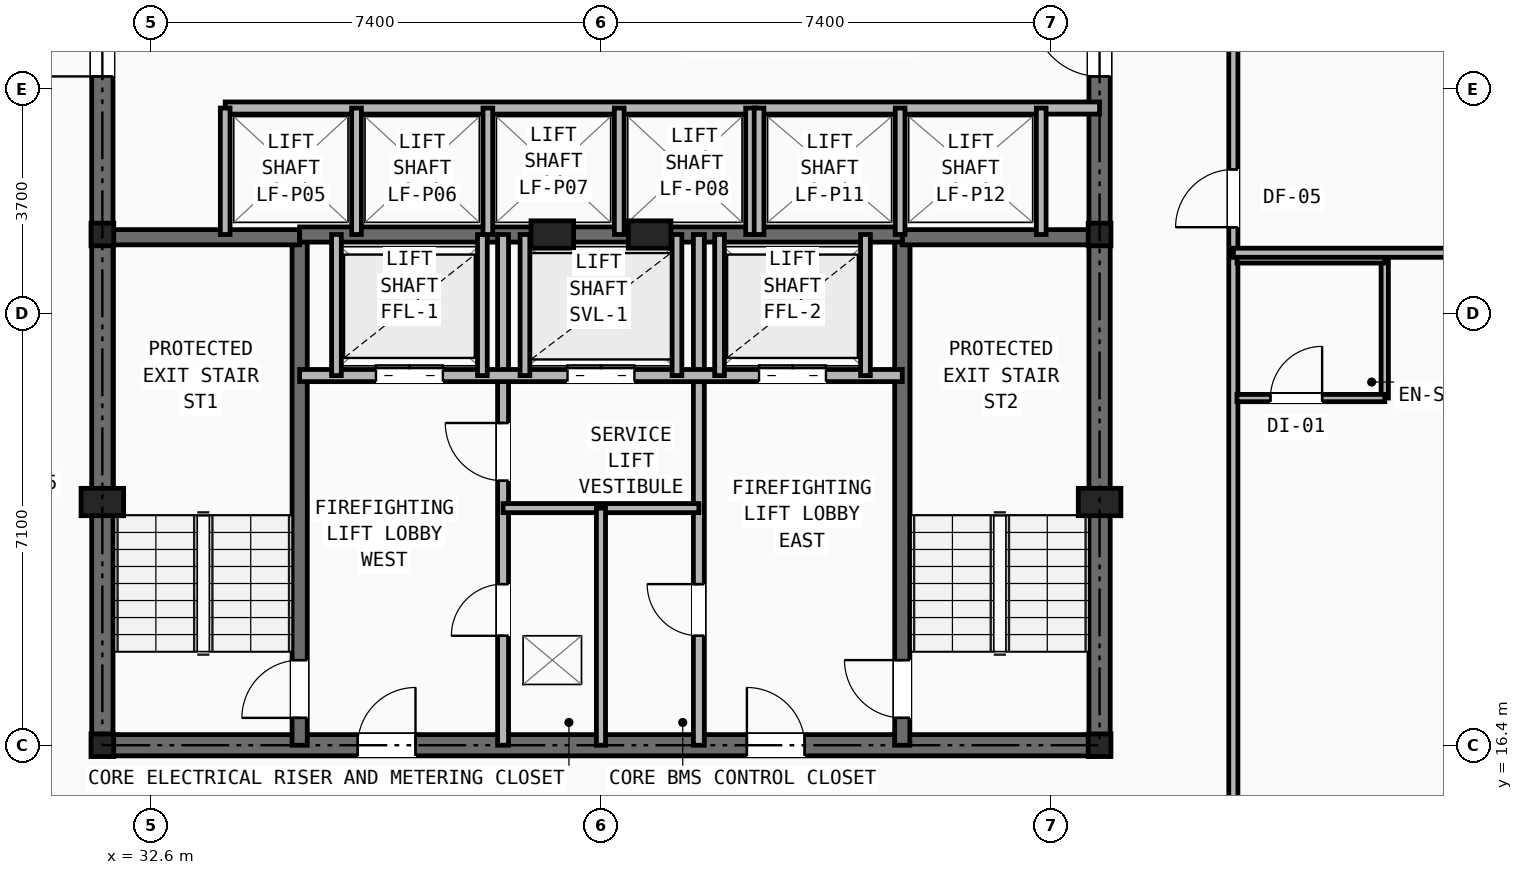
"""IFC4 building model, lengths in metres.
Left out: names, types, materials, properties, quantities, classifications, styles, units other than length and angle.
Written with IfcOpenShell. Run it as: python <this file> out.ifc"""

import sys

from ifc_helpers import new_model, si_unit, direction, frame, frame_2d, origin, origin_2d, place, context, subcontext, project, spatial, rectangle, i_section, extrude, element, fill, save


model = new_model("IFC4")
c1 = context("Model", 3, precision=1e-05, world=origin(), true_north=direction((0.0, 1.0)))
c2 = subcontext(c1, "Body", "Model", "MODEL_VIEW")
j1 = project(units=[si_unit("LENGTHUNIT", "METRE"), si_unit("PLANEANGLEUNIT", "RADIAN")], contexts=[c1])
p1 = place(None, origin())
s1 = spatial("IfcSite", under=j1, at=p1, CompositionType="ELEMENT")
p2 = place(p1, origin())
s2 = spatial("IfcBuilding", under=s1, at=p2, CompositionType="ELEMENT")
p3 = place(p2, frame((0.0, 0.0, 95.8)))
s3 = spatial("IfcBuildingStorey", under=s2, at=p3, CompositionType="ELEMENT", Elevation=95.8)
for number, where, z_axis, x_axis in (
    (1, (31.8, 16.4, 0.0), (0.0, 0.0, 1.0), (1.0, 0.0, 0.0)),
    (2, (48.2, 16.4, 0.0), (0.0, 0.0, 1.0), (1.0, 0.0, 0.0)),
    (3, (31.8, 24.8, 0.0), (0.0, 0.0, 1.0), (1.0, 0.0, 0.0)),
    (4, (48.2, 24.8, 0.0), (0.0, 0.0, 1.0), (1.0, 0.0, 0.0)),
):
    element("IfcColumn", number, at=place(p3, frame(where, z_axis=z_axis, x_axis=x_axis)), inside=s3, PredefinedType="COLUMN", context=c2, shape_type="SweptSolid", body=[
        extrude(i_section(OverallWidth=0.374, OverallDepth=0.372, WebThickness=0.016, FlangeThickness=0.026, at=origin_2d()), origin(), (0.0, 0.0, 1.0), 3.2),
    ])
for number, where, z_axis, x_axis in (
    (5, (31.8, 20.4, 0.0), (0.0, 0.0, 1.0), (1.0, 0.0, 0.0)),
    (6, (48.2, 20.4, 0.0), (0.0, 0.0, 1.0), (1.0, 0.0, 0.0)),
    (7, (39.2, 24.8, 0.0), (0.0, 0.0, 1.0), (1.0, 0.0, 0.0)),
    (8, (40.8, 24.8, 0.0), (0.0, 0.0, 1.0), (1.0, 0.0, 0.0)),
):
    element("IfcColumn", number, at=place(p3, frame(where, z_axis=z_axis, x_axis=x_axis)), inside=s3, PredefinedType="PILASTER", context=c2, shape_type="SweptSolid", body=[
        extrude(rectangle(XDim=0.7, YDim=0.45, at=origin_2d()), origin(), (0.0, 0.0, 1.0), 3.2),
    ])
p4 = place(p3, frame((31.8, 16.4, 0.0), z_axis=(0.0, 0.0, 1.0), x_axis=(1.0, 0.0, 0.0)))
e9 = element("IfcWall", 9, at=p4, inside=s3, PredefinedType="SHEAR", context=c2, shape_type="SweptSolid", body=[
    extrude(rectangle(XDim=16.4, YDim=0.35, at=frame_2d((8.2, 0.0))), origin(), (0.0, 0.0, 1.0), 2.97),
])
p5 = place(p4, frame((4.2, 0.0, 0.0)))
e10 = element("IfcOpeningElement", 10, at=p5, cuts=e9, PredefinedType="OPENING", context=c2, shape_type="SweptSolid", body=[
    extrude(rectangle(XDim=0.95, YDim=2.1, at=frame_2d((0.475, 1.05))), frame((0.0, 0.185, 0.0), z_axis=(0.0, -1.0, 0.0), x_axis=(1.0, 0.0, 0.0)), (0.0, 0.0, 1.0), 0.37),
])
p6 = place(p4, frame((10.6, 0.0, 0.0)))
e11 = element("IfcOpeningElement", 11, at=p6, cuts=e9, PredefinedType="OPENING", context=c2, shape_type="SweptSolid", body=[
    extrude(rectangle(XDim=0.95, YDim=2.1, at=frame_2d((0.475, 1.05))), frame((0.0, 0.185, 0.0), z_axis=(0.0, -1.0, 0.0), x_axis=(1.0, 0.0, 0.0)), (0.0, 0.0, 1.0), 0.37),
])
p7 = place(p3, frame((31.8, 16.4, 0.0), z_axis=(0.0, 0.0, 1.0), x_axis=(0.0, 1.0, 0.0)))
e12 = element("IfcWall", 12, at=p7, inside=s3, PredefinedType="SHEAR", context=c2, shape_type="SweptSolid", body=[
    extrude(rectangle(XDim=14.8, YDim=0.35, at=frame_2d((7.4, 0.0))), origin(), (0.0, 0.0, 1.0), 2.97),
])
p8 = place(p7, frame((11.0, 0.0, 0.0)))
e13 = element("IfcOpeningElement", 13, at=p8, cuts=e12, PredefinedType="OPENING", context=c2, shape_type="SweptSolid", body=[
    extrude(rectangle(XDim=1.1, YDim=2.15, at=frame_2d((0.55, 1.075))), frame((0.0, 0.185, 0.0), z_axis=(0.0, -1.0, 0.0), x_axis=(1.0, 0.0, 0.0)), (0.0, 0.0, 1.0), 0.37),
])
p9 = place(p3, frame((48.2, 16.4, 0.0), z_axis=(0.0, 0.0, 1.0), x_axis=(0.0, 1.0, 0.0)))
e14 = element("IfcWall", 14, at=p9, inside=s3, PredefinedType="SHEAR", context=c2, shape_type="SweptSolid", body=[
    extrude(rectangle(XDim=14.8, YDim=0.35, at=frame_2d((7.4, 0.0))), origin(), (0.0, 0.0, 1.0), 2.97),
])
p10 = place(p9, frame((11.0, 0.0, 0.0)))
e15 = element("IfcOpeningElement", 15, at=p10, cuts=e14, PredefinedType="OPENING", context=c2, shape_type="SweptSolid", body=[
    extrude(rectangle(XDim=1.1, YDim=2.15, at=frame_2d((0.55, 1.075))), frame((0.0, 0.185, 0.0), z_axis=(0.0, -1.0, 0.0), x_axis=(1.0, 0.0, 0.0)), (0.0, 0.0, 1.0), 0.37),
])
p11 = place(p3, frame((35.045, 16.4, 0.0), z_axis=(0.0, 0.0, 1.0), x_axis=(0.0, 1.0, 0.0)))
e16 = element("IfcWall", 16, at=p11, inside=s3, PredefinedType="SHEAR", context=c2, shape_type="SweptSolid", body=[
    extrude(rectangle(XDim=8.4, YDim=0.25, at=frame_2d((4.2, 0.0))), origin(), (0.0, 0.0, 1.0), 2.97),
])
p12 = place(p11, frame((0.45, 0.0, 0.0)))
e17 = element("IfcOpeningElement", 17, at=p12, cuts=e16, PredefinedType="OPENING", context=c2, shape_type="SweptSolid", body=[
    extrude(rectangle(XDim=0.95, YDim=2.1, at=frame_2d((0.475, 1.05))), frame((0.0, 0.135, 0.0), z_axis=(0.0, -1.0, 0.0), x_axis=(1.0, 0.0, 0.0)), (0.0, 0.0, 1.0), 0.27),
])
p13 = place(p3, frame((31.8, 24.755, 0.0), z_axis=(0.0, 0.0, 1.0), x_axis=(1.0, 0.0, 0.0)))
e18 = element("IfcWall", 18, at=p13, inside=s3, PredefinedType="SHEAR", context=c2, shape_type="SweptSolid", body=[
    extrude(rectangle(XDim=3.245, YDim=0.25, at=frame_2d((1.623, 0.0))), origin(), (0.0, 0.0, 1.0), 2.97),
])
p14 = place(p3, frame((44.955, 16.4, 0.0), z_axis=(0.0, 0.0, 1.0), x_axis=(0.0, 1.0, 0.0)))
e19 = element("IfcWall", 19, at=p14, inside=s3, PredefinedType="SHEAR", context=c2, shape_type="SweptSolid", body=[
    extrude(rectangle(XDim=8.4, YDim=0.25, at=frame_2d((4.2, 0.0))), origin(), (0.0, 0.0, 1.0), 2.97),
])
p15 = place(p14, frame((0.45, 0.0, 0.0)))
e20 = element("IfcOpeningElement", 20, at=p15, cuts=e19, PredefinedType="OPENING", context=c2, shape_type="SweptSolid", body=[
    extrude(rectangle(XDim=0.95, YDim=2.1, at=frame_2d((0.475, 1.05))), frame((0.0, 0.135, 0.0), z_axis=(0.0, -1.0, 0.0), x_axis=(1.0, 0.0, 0.0)), (0.0, 0.0, 1.0), 0.27),
])
p16 = place(p3, frame((44.955, 24.755, 0.0), z_axis=(0.0, 0.0, 1.0), x_axis=(1.0, 0.0, 0.0)))
e21 = element("IfcWall", 21, at=p16, inside=s3, PredefinedType="SHEAR", context=c2, shape_type="SweptSolid", body=[
    extrude(rectangle(XDim=3.245, YDim=0.25, at=frame_2d((1.623, 0.0))), origin(), (0.0, 0.0, 1.0), 2.97),
])
p17 = place(p3, frame((35.045, 24.8, 0.0), z_axis=(0.0, 0.0, 1.0), x_axis=(1.0, 0.0, 0.0)))
e22 = element("IfcWall", 22, at=p17, inside=s3, PredefinedType="SHEAR", context=c2, shape_type="SweptSolid", body=[
    extrude(rectangle(XDim=9.91, YDim=0.25, at=frame_2d((4.955, 0.0))), origin(), (0.0, 0.0, 1.0), 2.97),
])
p18 = place(p3, frame((38.39, 16.4, 0.0), z_axis=(0.0, 0.0, 1.0), x_axis=(0.0, 1.0, 0.0)))
e23 = element("IfcWall", 23, at=p18, inside=s3, PredefinedType="PARTITIONING", context=c2, shape_type="SweptSolid", body=[
    extrude(rectangle(XDim=8.4, YDim=0.18, at=frame_2d((4.2, 0.0))), origin(), (0.0, 0.0, 1.0), 2.421),
])
p19 = place(p18, frame((1.8, 0.0, 0.0)))
e24 = element("IfcOpeningElement", 24, at=p19, cuts=e23, PredefinedType="OPENING", context=c2, shape_type="SweptSolid", body=[
    extrude(rectangle(XDim=0.85, YDim=2.05, at=frame_2d((0.425, 1.025))), frame((0.0, 0.1, 0.0), z_axis=(0.0, -1.0, 0.0), x_axis=(1.0, 0.0, 0.0)), (0.0, 0.0, 1.0), 0.2),
])
p20 = place(p18, frame((4.35, 0.0, 0.0)))
e25 = element("IfcOpeningElement", 25, at=p20, cuts=e23, PredefinedType="OPENING", context=c2, shape_type="SweptSolid", body=[
    extrude(rectangle(XDim=0.95, YDim=2.1, at=frame_2d((0.475, 1.05))), frame((0.0, 0.1, 0.0), z_axis=(0.0, -1.0, 0.0), x_axis=(1.0, 0.0, 0.0)), (0.0, 0.0, 1.0), 0.2),
])
p21 = place(p3, frame((41.61, 16.4, 0.0), z_axis=(0.0, 0.0, 1.0), x_axis=(0.0, 1.0, 0.0)))
e26 = element("IfcWall", 26, at=p21, inside=s3, PredefinedType="PARTITIONING", context=c2, shape_type="SweptSolid", body=[
    extrude(rectangle(XDim=8.4, YDim=0.18, at=frame_2d((4.2, 0.0))), origin(), (0.0, 0.0, 1.0), 2.421),
])
p22 = place(p21, frame((1.8, 0.0, 0.0)))
e27 = element("IfcOpeningElement", 27, at=p22, cuts=e26, PredefinedType="OPENING", context=c2, shape_type="SweptSolid", body=[
    extrude(rectangle(XDim=0.85, YDim=2.05, at=frame_2d((0.425, 1.025))), frame((0.0, 0.1, 0.0), z_axis=(0.0, -1.0, 0.0), x_axis=(1.0, 0.0, 0.0)), (0.0, 0.0, 1.0), 0.2),
])
p23 = place(p3, frame((35.045, 22.48, 0.0), z_axis=(0.0, 0.0, 1.0), x_axis=(1.0, 0.0, 0.0)))
e28 = element("IfcWall", 28, at=p23, inside=s3, PredefinedType="SOLIDWALL", context=c2, shape_type="SweptSolid", body=[
    extrude(rectangle(XDim=9.91, YDim=0.2, at=frame_2d((4.955, 0.0))), origin(), (0.0, 0.0, 1.0), 2.97),
])
p24 = place(p23, frame((1.255, 0.0, 0.0)))
e29 = element("IfcOpeningElement", 29, at=p24, cuts=e28, PredefinedType="OPENING", context=c2, shape_type="SweptSolid", body=[
    extrude(rectangle(XDim=1.1, YDim=2.15, at=frame_2d((0.55, 1.075))), frame((0.0, 0.11, 0.0), z_axis=(0.0, -1.0, 0.0), x_axis=(1.0, 0.0, 0.0)), (0.0, 0.0, 1.0), 0.22),
])
p25 = place(p23, frame((7.555, 0.0, 0.0)))
e30 = element("IfcOpeningElement", 30, at=p25, cuts=e28, PredefinedType="OPENING", context=c2, shape_type="SweptSolid", body=[
    extrude(rectangle(XDim=1.1, YDim=2.15, at=frame_2d((0.55, 1.075))), frame((0.0, 0.11, 0.0), z_axis=(0.0, -1.0, 0.0), x_axis=(1.0, 0.0, 0.0)), (0.0, 0.0, 1.0), 0.22),
])
p26 = place(p23, frame((4.405, 0.0, 0.0)))
e31 = element("IfcOpeningElement", 31, at=p26, cuts=e28, PredefinedType="OPENING", context=c2, shape_type="SweptSolid", body=[
    extrude(rectangle(XDim=1.1, YDim=2.15, at=frame_2d((0.55, 1.075))), frame((0.0, 0.11, 0.0), z_axis=(0.0, -1.0, 0.0), x_axis=(1.0, 0.0, 0.0)), (0.0, 0.0, 1.0), 0.22),
])
p27 = place(p3, frame((38.39, 20.3, 0.0), z_axis=(0.0, 0.0, 1.0), x_axis=(1.0, 0.0, 0.0)))
e32 = element("IfcWall", 32, at=p27, inside=s3, PredefinedType="PARTITIONING", context=c2, shape_type="SweptSolid", body=[
    extrude(rectangle(XDim=3.22, YDim=0.15, at=frame_2d((1.61, 0.0))), origin(), (0.0, 0.0, 1.0), 2.97),
])
p28 = place(p3, frame((40.0, 16.4, 0.0), z_axis=(0.0, 0.0, 1.0), x_axis=(0.0, 1.0, 0.0)))
e33 = element("IfcWall", 33, at=p28, inside=s3, PredefinedType="PARTITIONING", context=c2, shape_type="SweptSolid", body=[
    extrude(rectangle(XDim=3.9, YDim=0.15, at=frame_2d((1.95, 0.0))), origin(), (0.0, 0.0, 1.0), 2.421),
])
for number, where, z_axis, x_axis in (
    (34, (35.65, 22.48, 0.0), (0.0, 0.0, 1.0), (0.0, 1.0, 0.0)),
    (35, (38.05, 22.48, 0.0), (0.0, 0.0, 1.0), (0.0, 1.0, 0.0)),
    (36, (41.95, 22.48, 0.0), (0.0, 0.0, 1.0), (0.0, 1.0, 0.0)),
    (37, (44.35, 22.48, 0.0), (0.0, 0.0, 1.0), (0.0, 1.0, 0.0)),
    (38, (38.75, 22.48, 0.0), (0.0, 0.0, 1.0), (0.0, 1.0, 0.0)),
    (39, (41.25, 22.48, 0.0), (0.0, 0.0, 1.0), (0.0, 1.0, 0.0)),
):
    element("IfcWall", number, at=place(p3, frame(where, z_axis=z_axis, x_axis=x_axis)), inside=s3, PredefinedType="SOLIDWALL", context=c2, shape_type="SweptSolid", body=[
        extrude(rectangle(XDim=2.32, YDim=0.16, at=frame_2d((1.16, 0.0))), origin(), (0.0, 0.0, 1.0), 2.97),
    ])
p29 = place(p3, frame((33.82, 26.88, 0.0), z_axis=(0.0, 0.0, 1.0), x_axis=(1.0, 0.0, 0.0)))
e40 = element("IfcWall", 40, at=p29, inside=s3, PredefinedType="SOLIDWALL", context=c2, shape_type="SweptSolid", body=[
    extrude(rectangle(XDim=14.38, YDim=0.2, at=frame_2d((7.19, 0.0))), origin(), (0.0, 0.0, 1.0), 2.421),
])
for number, where, z_axis, x_axis in (
    (41, (33.82, 24.8, 0.0), (0.0, 0.0, 1.0), (0.0, 1.0, 0.0)),
    (42, (35.98, 24.8, 0.0), (0.0, 0.0, 1.0), (0.0, 1.0, 0.0)),
    (43, (38.14, 24.8, 0.0), (0.0, 0.0, 1.0), (0.0, 1.0, 0.0)),
    (44, (40.3, 24.8, 0.0), (0.0, 0.0, 1.0), (0.0, 1.0, 0.0)),
    (45, (42.46, 24.8, 0.0), (0.0, 0.0, 1.0), (0.0, 1.0, 0.0)),
    (46, (42.6, 24.8, 0.0), (0.0, 0.0, 1.0), (0.0, 1.0, 0.0)),
    (47, (44.92, 24.8, 0.0), (0.0, 0.0, 1.0), (0.0, 1.0, 0.0)),
    (48, (47.24, 24.8, 0.0), (0.0, 0.0, 1.0), (0.0, 1.0, 0.0)),
):
    element("IfcWall", number, at=place(p3, frame(where, z_axis=z_axis, x_axis=x_axis)), inside=s3, PredefinedType="SOLIDWALL", context=c2, shape_type="SweptSolid", body=[
        extrude(rectangle(XDim=2.08, YDim=0.16, at=frame_2d((1.04, 0.0))), origin(), (0.0, 0.0, 1.0), 2.97),
    ])
p30 = place(p3, frame((50.4, 14.1, 0.0), z_axis=(0.0, 0.0, 1.0), x_axis=(0.0, 1.0, 0.0)))
e49 = element("IfcWall", 49, at=p30, inside=s3, PredefinedType="PARTITIONING", context=c2, shape_type="SweptSolid", body=[
    extrude(rectangle(XDim=21.9, YDim=0.15, at=frame_2d((10.95, 0.0))), origin(), (0.0, 0.0, 1.0), 2.421),
])
p31 = place(p30, frame((0.42, 0.0, 0.0)))
e50 = element("IfcOpeningElement", 50, at=p31, cuts=e49, PredefinedType="OPENING", context=c2, shape_type="SweptSolid", body=[
    extrude(rectangle(XDim=0.95, YDim=2.1, at=frame_2d((0.475, 1.05))), frame((0.0, 0.085, 0.0), z_axis=(0.0, -1.0, 0.0), x_axis=(1.0, 0.0, 0.0)), (0.0, 0.0, 1.0), 0.17),
])
p32 = place(p30, frame((10.82, 0.0, 0.0)))
e51 = element("IfcOpeningElement", 51, at=p32, cuts=e49, PredefinedType="OPENING", context=c2, shape_type="SweptSolid", body=[
    extrude(rectangle(XDim=0.95, YDim=2.1, at=frame_2d((0.475, 1.05))), frame((0.0, 0.085, 0.0), z_axis=(0.0, -1.0, 0.0), x_axis=(1.0, 0.0, 0.0)), (0.0, 0.0, 1.0), 0.17),
])
p33 = place(p3, frame((52.89, 22.11, 0.0), z_axis=(0.0, 0.0, 1.0), x_axis=(0.0, 1.0, 0.0)))
e52 = element("IfcWall", 52, at=p33, inside=s3, PredefinedType="PARTITIONING", context=c2, shape_type="SweptSolid", body=[
    extrude(rectangle(XDim=2.28, YDim=0.12, at=frame_2d((1.14, 0.0))), origin(), (0.0, 0.0, 1.0), 2.97),
])
p34 = place(p3, frame((50.46, 22.11, 0.0), z_axis=(0.0, 0.0, 1.0), x_axis=(1.0, 0.0, 0.0)))
e53 = element("IfcWall", 53, at=p34, inside=s3, PredefinedType="PARTITIONING", context=c2, shape_type="SweptSolid", body=[
    extrude(rectangle(XDim=2.43, YDim=0.12, at=frame_2d((1.215, 0.0))), origin(), (0.0, 0.0, 1.0), 2.97),
])
p35 = place(p34, frame((0.55, 0.0, 0.0)))
e54 = element("IfcOpeningElement", 54, at=p35, cuts=e53, PredefinedType="OPENING", context=c2, shape_type="SweptSolid", body=[
    extrude(rectangle(XDim=0.85, YDim=2.05, at=frame_2d((0.425, 1.025))), frame((0.0, 0.07, 0.0), z_axis=(0.0, -1.0, 0.0), x_axis=(1.0, 0.0, 0.0)), (0.0, 0.0, 1.0), 0.14),
])
p36 = place(p3, frame((50.46, 24.39, 0.0), z_axis=(0.0, 0.0, 1.0), x_axis=(1.0, 0.0, 0.0)))
e55 = element("IfcWall", 55, at=p36, inside=s3, PredefinedType="PARTITIONING", context=c2, shape_type="SweptSolid", body=[
    extrude(rectangle(XDim=2.43, YDim=0.12, at=frame_2d((1.215, 0.0))), origin(), (0.0, 0.0, 1.0), 2.97),
])
p37 = place(p3, frame((50.4, 24.5, 0.0), z_axis=(0.0, 0.0, 1.0), x_axis=(1.0, 0.0, 0.0)))
e56 = element("IfcWall", 56, at=p37, inside=s3, PredefinedType="PARTITIONING", context=c2, shape_type="SweptSolid", body=[
    extrude(rectangle(XDim=11.59, YDim=0.15, at=frame_2d((5.795, 0.0))), origin(), (0.0, 0.0, 1.0), 2.258),
])
p38 = place(p19, origin())
e57 = element("IfcDoor", 57, at=p38, inside=s3, OperationType="SINGLE_SWING_LEFT", PredefinedType="DOOR", context=c2, shape_type="SweptSolid", body=[
    extrude(rectangle(XDim=0.85, YDim=2.05, at=frame_2d((0.425, 1.025))), frame((0.0, 0.025, 0.0), z_axis=(0.0, -1.0, 0.0), x_axis=(1.0, 0.0, 0.0)), (0.0, 0.0, 1.0), 0.05),
])
fill(e24, e57)
p39 = place(p22, origin())
e58 = element("IfcDoor", 58, at=p39, inside=s3, OperationType="SINGLE_SWING_RIGHT", PredefinedType="DOOR", context=c2, shape_type="SweptSolid", body=[
    extrude(rectangle(XDim=0.85, YDim=2.05, at=frame_2d((0.425, 1.025))), frame((0.0, 0.025, 0.0), z_axis=(0.0, -1.0, 0.0), x_axis=(1.0, 0.0, 0.0)), (0.0, 0.0, 1.0), 0.05),
])
fill(e27, e58)
p40 = place(p20, origin())
e59 = element("IfcDoor", 59, at=p40, inside=s3, OperationType="SINGLE_SWING_RIGHT", PredefinedType="DOOR", context=c2, shape_type="SweptSolid", body=[
    extrude(rectangle(XDim=0.95, YDim=2.1, at=frame_2d((0.475, 1.05))), frame((0.0, 0.025, 0.0), z_axis=(0.0, -1.0, 0.0), x_axis=(1.0, 0.0, 0.0)), (0.0, 0.0, 1.0), 0.05),
])
fill(e25, e59)
p41 = place(p12, origin())
e60 = element("IfcDoor", 60, at=p41, inside=s3, OperationType="SINGLE_SWING_LEFT", PredefinedType="DOOR", context=c2, shape_type="SweptSolid", body=[
    extrude(rectangle(XDim=0.95, YDim=2.1, at=frame_2d((0.475, 1.05))), frame((0.0, 0.025, 0.0), z_axis=(0.0, -1.0, 0.0), x_axis=(1.0, 0.0, 0.0)), (0.0, 0.0, 1.0), 0.05),
])
fill(e17, e60)
p42 = place(p15, origin())
e61 = element("IfcDoor", 61, at=p42, inside=s3, OperationType="SINGLE_SWING_RIGHT", PredefinedType="DOOR", context=c2, shape_type="SweptSolid", body=[
    extrude(rectangle(XDim=0.95, YDim=2.1, at=frame_2d((0.475, 1.05))), frame((0.0, 0.025, 0.0), z_axis=(0.0, -1.0, 0.0), x_axis=(1.0, 0.0, 0.0)), (0.0, 0.0, 1.0), 0.05),
])
fill(e20, e61)
p43 = place(p5, origin())
e62 = element("IfcDoor", 62, at=p43, inside=s3, OperationType="SINGLE_SWING_RIGHT", PredefinedType="DOOR", context=c2, shape_type="SweptSolid", body=[
    extrude(rectangle(XDim=0.95, YDim=2.1, at=frame_2d((0.475, 1.05))), frame((0.0, 0.025, 0.0), z_axis=(0.0, -1.0, 0.0), x_axis=(1.0, 0.0, 0.0)), (0.0, 0.0, 1.0), 0.05),
])
fill(e10, e62)
p44 = place(p6, origin())
e63 = element("IfcDoor", 63, at=p44, inside=s3, OperationType="SINGLE_SWING_LEFT", PredefinedType="DOOR", context=c2, shape_type="SweptSolid", body=[
    extrude(rectangle(XDim=0.95, YDim=2.1, at=frame_2d((0.475, 1.05))), frame((0.0, 0.025, 0.0), z_axis=(0.0, -1.0, 0.0), x_axis=(1.0, 0.0, 0.0)), (0.0, 0.0, 1.0), 0.05),
])
fill(e11, e63)
p45 = place(p24, origin())
e64 = element("IfcDoor", 64, at=p45, inside=s3, OperationType="DOUBLE_DOOR_SLIDING", PredefinedType="DOOR", context=c2, shape_type="SweptSolid", body=[
    extrude(rectangle(XDim=1.1, YDim=2.15, at=frame_2d((0.55, 1.075))), frame((0.0, 0.025, 0.0), z_axis=(0.0, -1.0, 0.0), x_axis=(1.0, 0.0, 0.0)), (0.0, 0.0, 1.0), 0.05),
])
fill(e29, e64)
p46 = place(p25, origin())
e65 = element("IfcDoor", 65, at=p46, inside=s3, OperationType="DOUBLE_DOOR_SLIDING", PredefinedType="DOOR", context=c2, shape_type="SweptSolid", body=[
    extrude(rectangle(XDim=1.1, YDim=2.15, at=frame_2d((0.55, 1.075))), frame((0.0, 0.025, 0.0), z_axis=(0.0, -1.0, 0.0), x_axis=(1.0, 0.0, 0.0)), (0.0, 0.0, 1.0), 0.05),
])
fill(e30, e65)
p47 = place(p26, origin())
e66 = element("IfcDoor", 66, at=p47, inside=s3, OperationType="DOUBLE_DOOR_SLIDING", PredefinedType="DOOR", context=c2, shape_type="SweptSolid", body=[
    extrude(rectangle(XDim=1.1, YDim=2.15, at=frame_2d((0.55, 1.075))), frame((0.0, 0.025, 0.0), z_axis=(0.0, -1.0, 0.0), x_axis=(1.0, 0.0, 0.0)), (0.0, 0.0, 1.0), 0.05),
])
fill(e31, e66)
p48 = place(p8, origin())
e67 = element("IfcDoor", 67, at=p48, inside=s3, OperationType="SINGLE_SWING_LEFT", PredefinedType="DOOR", context=c2, shape_type="SweptSolid", body=[
    extrude(rectangle(XDim=1.1, YDim=2.15, at=frame_2d((0.55, 1.075))), frame((0.0, 0.025, 0.0), z_axis=(0.0, -1.0, 0.0), x_axis=(1.0, 0.0, 0.0)), (0.0, 0.0, 1.0), 0.05),
])
fill(e13, e67)
p49 = place(p10, origin())
e68 = element("IfcDoor", 68, at=p49, inside=s3, OperationType="SINGLE_SWING_RIGHT", PredefinedType="DOOR", context=c2, shape_type="SweptSolid", body=[
    extrude(rectangle(XDim=1.1, YDim=2.15, at=frame_2d((0.55, 1.075))), frame((0.0, 0.025, 0.0), z_axis=(0.0, -1.0, 0.0), x_axis=(1.0, 0.0, 0.0)), (0.0, 0.0, 1.0), 0.05),
])
fill(e15, e68)
p50 = place(p35, origin())
e69 = element("IfcDoor", 69, at=p50, inside=s3, OperationType="SINGLE_SWING_RIGHT", PredefinedType="DOOR", context=c2, shape_type="SweptSolid", body=[
    extrude(rectangle(XDim=0.85, YDim=2.05, at=frame_2d((0.425, 1.025))), frame((0.0, 0.025, 0.0), z_axis=(0.0, -1.0, 0.0), x_axis=(1.0, 0.0, 0.0)), (0.0, 0.0, 1.0), 0.05),
])
fill(e54, e69)
p51 = place(p32, origin())
e70 = element("IfcDoor", 70, at=p51, inside=s3, OperationType="SINGLE_SWING_LEFT", PredefinedType="DOOR", context=c2, shape_type="SweptSolid", body=[
    extrude(rectangle(XDim=0.95, YDim=2.1, at=frame_2d((0.475, 1.05))), frame((0.0, 0.025, 0.0), z_axis=(0.0, -1.0, 0.0), x_axis=(1.0, 0.0, 0.0)), (0.0, 0.0, 1.0), 0.05),
])
fill(e51, e70)
save(model, sys.argv[1])
